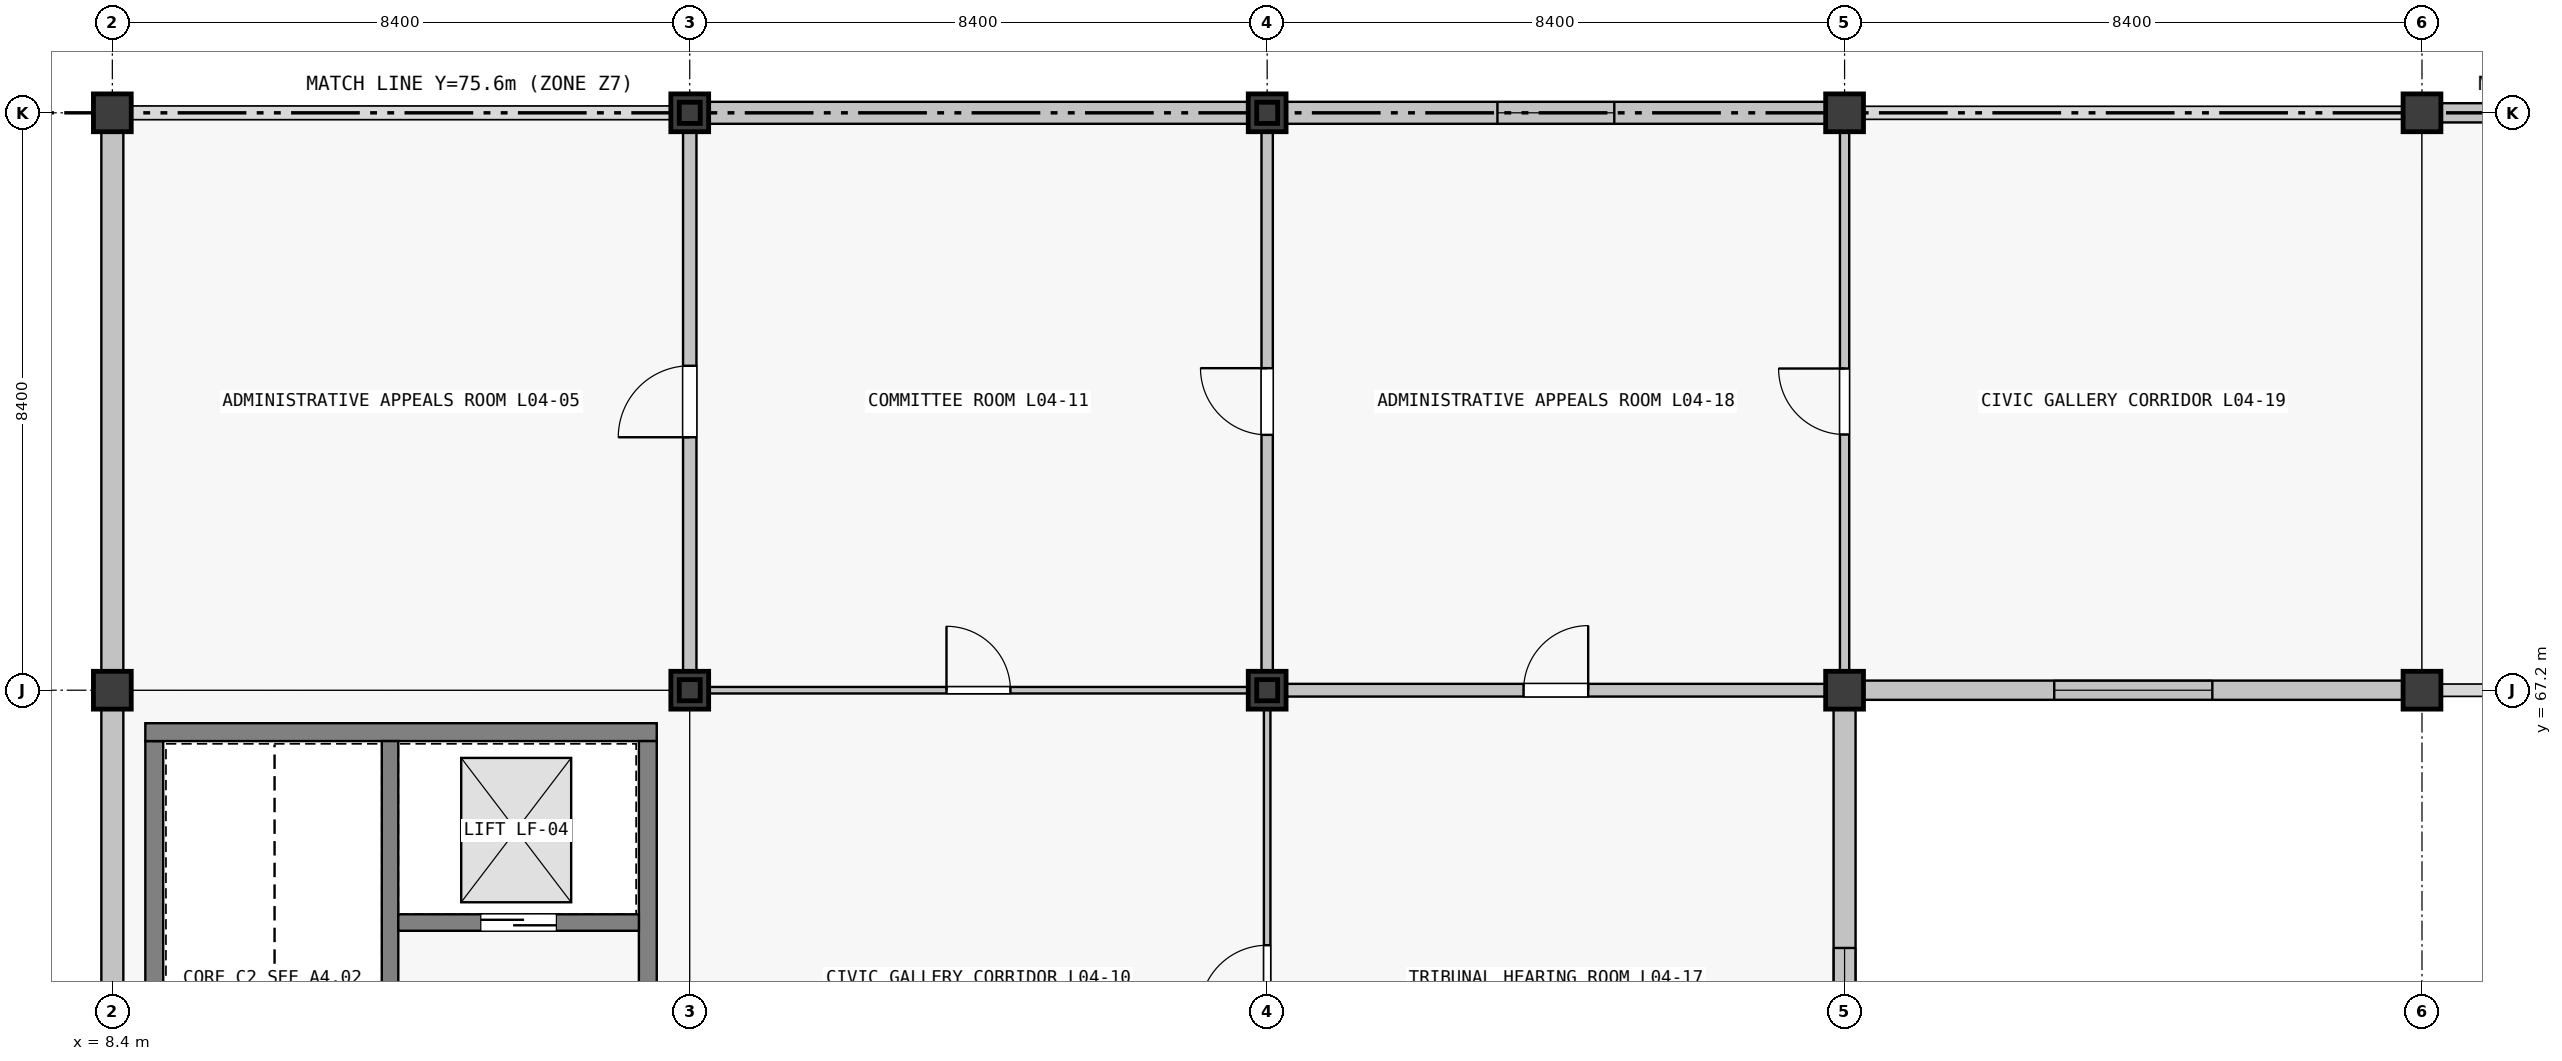
"""IFC4 building model, lengths in metres.
Left out: names, types, materials, properties, quantities, classifications, styles, units other than length and angle.
Written with IfcOpenShell. Run it as: python <this file> out.ifc"""

import sys

from ifc_helpers import new_model, si_unit, direction, frame, frame_2d, origin, origin_2d, place, context, subcontext, project, spatial, rectangle, i_section, extrude, element, fill, save


model = new_model("IFC4")
c1 = context("Model", 3, precision=1e-05, world=origin(), true_north=direction((0.0, 1.0)))
c2 = subcontext(c1, "Body", "Model", "MODEL_VIEW")
j1 = project(units=[si_unit("LENGTHUNIT", "METRE"), si_unit("PLANEANGLEUNIT", "RADIAN")], contexts=[c1])
p1 = place(None, origin())
s1 = spatial("IfcSite", under=j1, at=p1, CompositionType="ELEMENT")
p2 = place(p1, origin())
s2 = spatial("IfcBuilding", under=s1, at=p2, CompositionType="ELEMENT")
p3 = place(p2, frame((0.0, 0.0, 19.08)))
s3 = spatial("IfcBuildingStorey", under=s2, at=p3, CompositionType="ELEMENT", Elevation=19.08)
for number, where, z_axis, x_axis in (
    (1, (8.4, 67.2, 0.0), (0.0, 0.0, 1.0), (1.0, 0.0, 0.0)),
    (2, (8.4, 75.6, 0.0), (0.0, 0.0, 1.0), (1.0, 0.0, 0.0)),
    (3, (16.8, 67.2, 0.0), (0.0, 0.0, 1.0), (1.0, 0.0, 0.0)),
    (4, (16.8, 75.6, 0.0), (0.0, 0.0, 1.0), (1.0, 0.0, 0.0)),
    (5, (25.2, 67.2, 0.0), (0.0, 0.0, 1.0), (1.0, 0.0, 0.0)),
    (6, (25.2, 75.6, 0.0), (0.0, 0.0, 1.0), (1.0, 0.0, 0.0)),
    (7, (33.6, 67.2, 0.0), (0.0, 0.0, 1.0), (1.0, 0.0, 0.0)),
    (8, (33.6, 75.6, 0.0), (0.0, 0.0, 1.0), (1.0, 0.0, 0.0)),
):
    element("IfcColumn", number, at=place(p3, frame(where, z_axis=z_axis, x_axis=x_axis)), inside=s3, PredefinedType="COLUMN", context=c2, shape_type="SweptSolid", body=[
        extrude(rectangle(XDim=0.55, YDim=0.55, at=origin_2d()), origin(), (0.0, 0.0, 1.0), 4.16),
    ])
for number, where, z_axis, x_axis in (
    (9, (42.0, 67.2, 0.0), (0.0, 0.0, 1.0), (1.0, 0.0, 0.0)),
    (10, (42.0, 75.6, 0.0), (0.0, 0.0, 1.0), (1.0, 0.0, 0.0)),
):
    element("IfcColumn", number, at=place(p3, frame(where, z_axis=z_axis, x_axis=x_axis)), inside=s3, PredefinedType="COLUMN", context=c2, shape_type="SweptSolid", body=[
        extrude(rectangle(XDim=0.55, YDim=0.55, at=origin_2d()), origin(), (0.0, 0.0, 1.0), 4.07),
    ])
for number, where, z_axis, x_axis in (
    (11, (16.8, 67.2, 4.16), (0.0, 0.0, 1.0), (1.0, 0.0, 0.0)),
    (12, (25.2, 67.2, 4.16), (0.0, 0.0, 1.0), (1.0, 0.0, 0.0)),
    (13, (16.8, 75.6, 4.16), (0.0, 0.0, 1.0), (1.0, 0.0, 0.0)),
    (14, (25.2, 75.6, 4.16), (0.0, 0.0, 1.0), (1.0, 0.0, 0.0)),
):
    element("IfcColumn", number, at=place(p3, frame(where, z_axis=z_axis, x_axis=x_axis)), inside=s3, PredefinedType="COLUMN", context=c2, shape_type="SweptSolid", body=[
        extrude(i_section(OverallWidth=0.305, OverallDepth=0.308, WebThickness=0.01, FlangeThickness=0.015, FilletRadius=0.017, at=origin_2d()), origin(), (0.0, 0.0, 1.0), 1.925),
    ])
p4 = place(p3, frame((8.4, 59.076, 0.0), z_axis=(0.0, 0.0, 1.0), x_axis=(0.0, 1.0, 0.0)))
e15 = element("IfcWall", 15, at=p4, inside=s3, PredefinedType="SOLIDWALL", context=c2, shape_type="SweptSolid", body=[
    extrude(rectangle(XDim=7.848, YDim=0.32, at=frame_2d((3.924, 0.0))), origin(), (0.0, 0.0, 1.0), 3.37),
])
p5 = place(p3, frame((8.4, 67.476, 0.0), z_axis=(0.0, 0.0, 1.0), x_axis=(0.0, 1.0, 0.0)))
e16 = element("IfcWall", 16, at=p5, inside=s3, PredefinedType="SOLIDWALL", context=c2, shape_type="SweptSolid", body=[
    extrude(rectangle(XDim=7.848, YDim=0.32, at=frame_2d((3.924, 0.0))), origin(), (0.0, 0.0, 1.0), 3.37),
])
p6 = place(p3, frame((17.076, 75.6, 0.0), z_axis=(0.0, 0.0, 1.0), x_axis=(1.0, 0.0, 0.0)))
e17 = element("IfcWall", 17, at=p6, inside=s3, PredefinedType="SOLIDWALL", context=c2, shape_type="SweptSolid", body=[
    extrude(rectangle(XDim=7.848, YDim=0.32, at=frame_2d((3.924, 0.0))), origin(), (0.0, 0.0, 1.0), 3.37),
])
p7 = place(p3, frame((33.6, 66.924, 0.0), z_axis=(0.0, 0.0, 1.0), x_axis=(0.0, -1.0, 0.0)))
e18 = element("IfcWall", 18, at=p7, inside=s3, PredefinedType="SOLIDWALL", context=c2, shape_type="SweptSolid", body=[
    extrude(rectangle(XDim=7.848, YDim=0.32, at=frame_2d((3.924, 0.0))), origin(), (0.0, 0.0, 1.0), 3.37),
])
p8 = place(p7, frame((3.474, 0.0, 0.9)))
e19 = element("IfcOpeningElement", 19, at=p8, cuts=e18, PredefinedType="OPENING", context=c2, shape_type="SweptSolid", body=[
    extrude(rectangle(XDim=0.9, YDim=1.5, at=frame_2d((0.45, 0.75))), frame((0.0, 0.16, 0.0), z_axis=(0.0, -1.0, 0.0), x_axis=(1.0, 0.0, 0.0)), (0.0, 0.0, 1.0), 0.32),
])
p9 = place(p3, frame((25.476, 75.6, 0.0), z_axis=(0.0, 0.0, 1.0), x_axis=(1.0, 0.0, 0.0)))
e20 = element("IfcWall", 20, at=p9, inside=s3, PredefinedType="SOLIDWALL", context=c2, shape_type="SweptSolid", body=[
    extrude(rectangle(XDim=7.848, YDim=0.32, at=frame_2d((3.924, 0.0))), origin(), (0.0, 0.0, 1.0), 3.37),
])
p10 = place(p9, frame((3.074, 0.0, 0.9)))
e21 = element("IfcOpeningElement", 21, at=p10, cuts=e20, PredefinedType="OPENING", context=c2, shape_type="SweptSolid", body=[
    extrude(rectangle(XDim=1.7, YDim=1.85, at=frame_2d((0.85, 0.925))), frame((0.0, 0.16, 0.0), z_axis=(0.0, -1.0, 0.0), x_axis=(1.0, 0.0, 0.0)), (0.0, 0.0, 1.0), 0.32),
])
p11 = place(p3, frame((41.724, 67.2, 0.0), z_axis=(0.0, 0.0, 1.0), x_axis=(-1.0, 0.0, 0.0)))
e22 = element("IfcWall", 22, at=p11, inside=s3, PredefinedType="SOLIDWALL", context=c2, shape_type="SweptSolid", body=[
    extrude(rectangle(XDim=7.848, YDim=0.28, at=frame_2d((3.924, 0.0))), origin(), (0.0, 0.0, 1.0), 3.37),
])
p12 = place(p11, frame((2.774, 0.0, 0.9)))
e23 = element("IfcOpeningElement", 23, at=p12, cuts=e22, PredefinedType="OPENING", context=c2, shape_type="SweptSolid", body=[
    extrude(rectangle(XDim=2.3, YDim=1.85, at=frame_2d((1.15, 0.925))), frame((0.0, 0.14, 0.0), z_axis=(0.0, -1.0, 0.0), x_axis=(1.0, 0.0, 0.0)), (0.0, 0.0, 1.0), 0.28),
])
p13 = place(p3, frame((42.276, 75.6, 0.0), z_axis=(0.0, 0.0, 1.0), x_axis=(1.0, 0.0, 0.0)))
e24 = element("IfcWall", 24, at=p13, inside=s3, PredefinedType="SOLIDWALL", context=c2, shape_type="SweptSolid", body=[
    extrude(rectangle(XDim=7.848, YDim=0.28, at=frame_2d((3.924, 0.0))), origin(), (0.0, 0.0, 1.0), 3.37),
])
p14 = place(p13, frame((2.474, 0.0, 0.9)))
e25 = element("IfcOpeningElement", 25, at=p14, cuts=e24, PredefinedType="OPENING", context=c2, shape_type="SweptSolid", body=[
    extrude(rectangle(XDim=2.9, YDim=1.85, at=frame_2d((1.45, 0.925))), frame((0.0, 0.14, 0.0), z_axis=(0.0, -1.0, 0.0), x_axis=(1.0, 0.0, 0.0)), (0.0, 0.0, 1.0), 0.28),
])
p15 = place(p3, frame((9.01, 59.54, 0.0), z_axis=(0.0, 0.0, 1.0), x_axis=(0.0, 1.0, 0.0)))
e26 = element("IfcWall", 26, at=p15, inside=s3, PredefinedType="SHEAR", context=c2, shape_type="SweptSolid", body=[
    extrude(rectangle(XDim=6.92, YDim=0.26, at=frame_2d((3.46, 0.0))), origin(), (0.0, 0.0, 1.0), 4.07),
])
p16 = place(p3, frame((8.88, 66.59, 0.0), z_axis=(0.0, 0.0, 1.0), x_axis=(1.0, 0.0, 0.0)))
e27 = element("IfcWall", 27, at=p16, inside=s3, PredefinedType="SHEAR", context=c2, shape_type="SweptSolid", body=[
    extrude(rectangle(XDim=7.44, YDim=0.26, at=frame_2d((3.72, 0.0))), origin(), (0.0, 0.0, 1.0), 4.07),
])
p17 = place(p3, frame((16.19, 66.46, 0.0), z_axis=(0.0, 0.0, 1.0), x_axis=(0.0, -1.0, 0.0)))
e28 = element("IfcWall", 28, at=p17, inside=s3, PredefinedType="SHEAR", context=c2, shape_type="SweptSolid", body=[
    extrude(rectangle(XDim=6.92, YDim=0.26, at=frame_2d((3.46, 0.0))), origin(), (0.0, 0.0, 1.0), 4.07),
])
p18 = place(p3, frame((12.44, 59.54, 0.0), z_axis=(0.0, 0.0, 1.0), x_axis=(0.0, 1.0, 0.0)))
e29 = element("IfcWall", 29, at=p18, inside=s3, PredefinedType="SHEAR", context=c2, shape_type="SweptSolid", body=[
    extrude(rectangle(XDim=6.92, YDim=0.24, at=frame_2d((3.46, 0.0))), origin(), (0.0, 0.0, 1.0), 4.07),
])
p19 = place(p18, frame((0.12, 0.0, 0.0)))
e30 = element("IfcOpeningElement", 30, at=p19, cuts=e29, PredefinedType="OPENING", context=c2, shape_type="SweptSolid", body=[
    extrude(rectangle(XDim=1.0, YDim=2.15, at=frame_2d((0.5, 1.075))), frame((0.0, 0.12, 0.0), z_axis=(0.0, -1.0, 0.0), x_axis=(1.0, 0.0, 0.0)), (0.0, 0.0, 1.0), 0.24),
])
p20 = place(p3, frame((12.56, 63.82, 0.0), z_axis=(0.0, 0.0, 1.0), x_axis=(1.0, 0.0, 0.0)))
e31 = element("IfcWall", 31, at=p20, inside=s3, PredefinedType="SHEAR", context=c2, shape_type="SweptSolid", body=[
    extrude(rectangle(XDim=3.5, YDim=0.24, at=frame_2d((1.75, 0.0))), origin(), (0.0, 0.0, 1.0), 4.07),
])
p21 = place(p20, frame((1.2, 0.0, 0.0)))
e32 = element("IfcOpeningElement", 32, at=p21, cuts=e31, PredefinedType="OPENING", context=c2, shape_type="SweptSolid", body=[
    extrude(rectangle(XDim=1.1, YDim=2.15, at=frame_2d((0.55, 1.075))), frame((0.0, 0.12, 0.0), z_axis=(0.0, -1.0, 0.0), x_axis=(1.0, 0.0, 0.0)), (0.0, 0.0, 1.0), 0.24),
])
p22 = place(p3, frame((17.077, 67.2, 0.0), z_axis=(0.0, 0.0, 1.0), x_axis=(1.0, 0.0, 0.0)))
e33 = element("IfcWall", 33, at=p22, inside=s3, PredefinedType="PARTITIONING", context=c2, shape_type="SweptSolid", body=[
    extrude(rectangle(XDim=7.846, YDim=0.095, at=frame_2d((3.923, 0.0))), origin(), (0.0, 0.0, 1.0), 3.19),
])
p23 = place(p22, frame((3.458, 0.0, 0.0)))
e34 = element("IfcOpeningElement", 34, at=p23, cuts=e33, PredefinedType="OPENING", context=c2, shape_type="SweptSolid", body=[
    extrude(rectangle(XDim=0.93, YDim=2.12, at=frame_2d((0.465, 1.06))), frame((0.0, 0.047, 0.0), z_axis=(0.0, -1.0, 0.0), x_axis=(1.0, 0.0, 0.0)), (0.0, 0.0, 1.0), 0.095),
])
p24 = place(p3, frame((25.477, 67.2, 0.0), z_axis=(0.0, 0.0, 1.0), x_axis=(1.0, 0.0, 0.0)))
e35 = element("IfcWall", 35, at=p24, inside=s3, PredefinedType="PARTITIONING", context=c2, shape_type="SweptSolid", body=[
    extrude(rectangle(XDim=7.846, YDim=0.185, at=frame_2d((3.923, 0.0))), origin(), (0.0, 0.0, 1.0), 3.19),
])
p25 = place(p24, frame((3.453, 0.0, 0.0)))
e36 = element("IfcOpeningElement", 36, at=p25, cuts=e35, PredefinedType="OPENING", context=c2, shape_type="SweptSolid", body=[
    extrude(rectangle(XDim=0.94, YDim=2.15, at=frame_2d((0.47, 1.075))), frame((0.0, 0.093, 0.0), z_axis=(0.0, -1.0, 0.0), x_axis=(1.0, 0.0, 0.0)), (0.0, 0.0, 1.0), 0.185),
])
p26 = place(p3, frame((16.8, 67.477, 0.0), z_axis=(0.0, 0.0, 1.0), x_axis=(0.0, 1.0, 0.0)))
e37 = element("IfcWall", 37, at=p26, inside=s3, PredefinedType="PARTITIONING", context=c2, shape_type="SweptSolid", body=[
    extrude(rectangle(XDim=7.846, YDim=0.195, at=frame_2d((3.923, 0.0))), origin(), (0.0, 0.0, 1.0), 3.19),
])
p27 = place(p26, frame((3.403, 0.0, 0.0)))
e38 = element("IfcOpeningElement", 38, at=p27, cuts=e37, PredefinedType="OPENING", context=c2, shape_type="SweptSolid", body=[
    extrude(rectangle(XDim=1.04, YDim=2.2, at=frame_2d((0.52, 1.1))), frame((0.0, 0.098, 0.0), z_axis=(0.0, -1.0, 0.0), x_axis=(1.0, 0.0, 0.0)), (0.0, 0.0, 1.0), 0.195),
])
p28 = place(p3, frame((25.2, 59.077, 0.0), z_axis=(0.0, 0.0, 1.0), x_axis=(0.0, 1.0, 0.0)))
e39 = element("IfcWall", 39, at=p28, inside=s3, PredefinedType="PARTITIONING", context=c2, shape_type="SweptSolid", body=[
    extrude(rectangle(XDim=7.846, YDim=0.095, at=frame_2d((3.923, 0.0))), origin(), (0.0, 0.0, 1.0), 3.19),
])
p29 = place(p28, frame((3.433, 0.0, 0.0)))
e40 = element("IfcOpeningElement", 40, at=p29, cuts=e39, PredefinedType="OPENING", context=c2, shape_type="SweptSolid", body=[
    extrude(rectangle(XDim=0.98, YDim=2.18, at=frame_2d((0.49, 1.09))), frame((0.0, 0.047, 0.0), z_axis=(0.0, -1.0, 0.0), x_axis=(1.0, 0.0, 0.0)), (0.0, 0.0, 1.0), 0.095),
])
p30 = place(p3, frame((25.2, 67.477, 0.0), z_axis=(0.0, 0.0, 1.0), x_axis=(0.0, 1.0, 0.0)))
e41 = element("IfcWall", 41, at=p30, inside=s3, PredefinedType="PARTITIONING", context=c2, shape_type="SweptSolid", body=[
    extrude(rectangle(XDim=7.846, YDim=0.165, at=frame_2d((3.923, 0.0))), origin(), (0.0, 0.0, 1.0), 3.19),
])
p31 = place(p30, frame((3.438, 0.0, 0.0)))
e42 = element("IfcOpeningElement", 42, at=p31, cuts=e41, PredefinedType="OPENING", context=c2, shape_type="SweptSolid", body=[
    extrude(rectangle(XDim=0.97, YDim=2.12, at=frame_2d((0.485, 1.06))), frame((0.0, 0.083, 0.0), z_axis=(0.0, -1.0, 0.0), x_axis=(1.0, 0.0, 0.0)), (0.0, 0.0, 1.0), 0.165),
])
p32 = place(p3, frame((33.6, 67.477, 0.0), z_axis=(0.0, 0.0, 1.0), x_axis=(0.0, 1.0, 0.0)))
e43 = element("IfcWall", 43, at=p32, inside=s3, PredefinedType="PARTITIONING", context=c2, shape_type="SweptSolid", body=[
    extrude(rectangle(XDim=7.846, YDim=0.135, at=frame_2d((3.923, 0.0))), origin(), (0.0, 0.0, 1.0), 3.19),
])
p33 = place(p32, frame((3.443, 0.0, 0.0)))
e44 = element("IfcOpeningElement", 44, at=p33, cuts=e43, PredefinedType="OPENING", context=c2, shape_type="SweptSolid", body=[
    extrude(rectangle(XDim=0.96, YDim=2.18, at=frame_2d((0.48, 1.09))), frame((0.0, 0.067, 0.0), z_axis=(0.0, -1.0, 0.0), x_axis=(1.0, 0.0, 0.0)), (0.0, 0.0, 1.0), 0.135),
])
p34 = place(p8, origin())
e45 = element("IfcWindow", 45, at=p34, inside=s3, PartitioningType="SINGLE_PANEL", PredefinedType="WINDOW", context=c2, shape_type="SweptSolid", body=[
    extrude(rectangle(XDim=0.9, YDim=1.5, at=frame_2d((0.45, 0.75))), frame((0.0, 0.03, 0.0), z_axis=(0.0, -1.0, 0.0), x_axis=(1.0, 0.0, 0.0)), (0.0, 0.0, 1.0), 0.06),
])
fill(e19, e45)
p35 = place(p10, origin())
e46 = element("IfcWindow", 46, at=p35, inside=s3, PartitioningType="SINGLE_PANEL", PredefinedType="WINDOW", context=c2, shape_type="SweptSolid", body=[
    extrude(rectangle(XDim=1.7, YDim=1.85, at=frame_2d((0.85, 0.925))), frame((0.0, 0.03, 0.0), z_axis=(0.0, -1.0, 0.0), x_axis=(1.0, 0.0, 0.0)), (0.0, 0.0, 1.0), 0.06),
])
fill(e21, e46)
p36 = place(p12, origin())
e47 = element("IfcWindow", 47, at=p36, inside=s3, PartitioningType="SINGLE_PANEL", PredefinedType="WINDOW", context=c2, shape_type="SweptSolid", body=[
    extrude(rectangle(XDim=2.3, YDim=1.85, at=frame_2d((1.15, 0.925))), frame((0.0, 0.03, 0.0), z_axis=(0.0, -1.0, 0.0), x_axis=(1.0, 0.0, 0.0)), (0.0, 0.0, 1.0), 0.06),
])
fill(e23, e47)
p37 = place(p21, origin())
e48 = element("IfcDoor", 48, at=p37, inside=s3, OperationType="DOUBLE_DOOR_SLIDING", PredefinedType="DOOR", context=c2, shape_type="SweptSolid", body=[
    extrude(rectangle(XDim=1.1, YDim=2.15, at=frame_2d((0.55, 1.075))), frame((0.0, 0.025, 0.0), z_axis=(0.0, -1.0, 0.0), x_axis=(1.0, 0.0, 0.0)), (0.0, 0.0, 1.0), 0.05),
])
fill(e32, e48)
p38 = place(p23, origin())
e49 = element("IfcDoor", 49, at=p38, inside=s3, OperationType="SINGLE_SWING_LEFT", PredefinedType="DOOR", context=c2, shape_type="SweptSolid", body=[
    extrude(rectangle(XDim=0.93, YDim=2.12, at=frame_2d((0.465, 1.06))), frame((0.0, 0.025, 0.0), z_axis=(0.0, -1.0, 0.0), x_axis=(1.0, 0.0, 0.0)), (0.0, 0.0, 1.0), 0.05),
])
fill(e34, e49)
p39 = place(p29, origin())
e50 = element("IfcDoor", 50, at=p39, inside=s3, OperationType="SINGLE_SWING_LEFT", PredefinedType="DOOR", context=c2, shape_type="SweptSolid", body=[
    extrude(rectangle(XDim=0.98, YDim=2.18, at=frame_2d((0.49, 1.09))), frame((0.0, 0.025, 0.0), z_axis=(0.0, -1.0, 0.0), x_axis=(1.0, 0.0, 0.0)), (0.0, 0.0, 1.0), 0.05),
])
fill(e40, e50)
p40 = place(p33, origin())
e51 = element("IfcDoor", 51, at=p40, inside=s3, OperationType="SINGLE_SWING_RIGHT", PredefinedType="DOOR", context=c2, shape_type="SweptSolid", body=[
    extrude(rectangle(XDim=0.96, YDim=2.18, at=frame_2d((0.48, 1.09))), frame((0.0, 0.025, 0.0), z_axis=(0.0, -1.0, 0.0), x_axis=(1.0, 0.0, 0.0)), (0.0, 0.0, 1.0), 0.05),
])
fill(e44, e51)
p41 = place(p27, origin())
e52 = element("IfcDoor", 52, at=p41, inside=s3, OperationType="SINGLE_SWING_LEFT", PredefinedType="DOOR", context=c2, shape_type="SweptSolid", body=[
    extrude(rectangle(XDim=1.04, YDim=2.2, at=frame_2d((0.52, 1.1))), frame((0.0, 0.025, 0.0), z_axis=(0.0, -1.0, 0.0), x_axis=(1.0, 0.0, 0.0)), (0.0, 0.0, 1.0), 0.05),
])
fill(e38, e52)
p42 = place(p25, origin())
e53 = element("IfcDoor", 53, at=p42, inside=s3, OperationType="SINGLE_SWING_RIGHT", PredefinedType="DOOR", context=c2, shape_type="SweptSolid", body=[
    extrude(rectangle(XDim=0.94, YDim=2.15, at=frame_2d((0.47, 1.075))), frame((0.0, 0.025, 0.0), z_axis=(0.0, -1.0, 0.0), x_axis=(1.0, 0.0, 0.0)), (0.0, 0.0, 1.0), 0.05),
])
fill(e36, e53)
p43 = place(p31, origin())
e54 = element("IfcDoor", 54, at=p43, inside=s3, OperationType="SINGLE_SWING_RIGHT", PredefinedType="DOOR", context=c2, shape_type="SweptSolid", body=[
    extrude(rectangle(XDim=0.97, YDim=2.12, at=frame_2d((0.485, 1.06))), frame((0.0, 0.025, 0.0), z_axis=(0.0, -1.0, 0.0), x_axis=(1.0, 0.0, 0.0)), (0.0, 0.0, 1.0), 0.05),
])
fill(e42, e54)
save(model, sys.argv[1])
